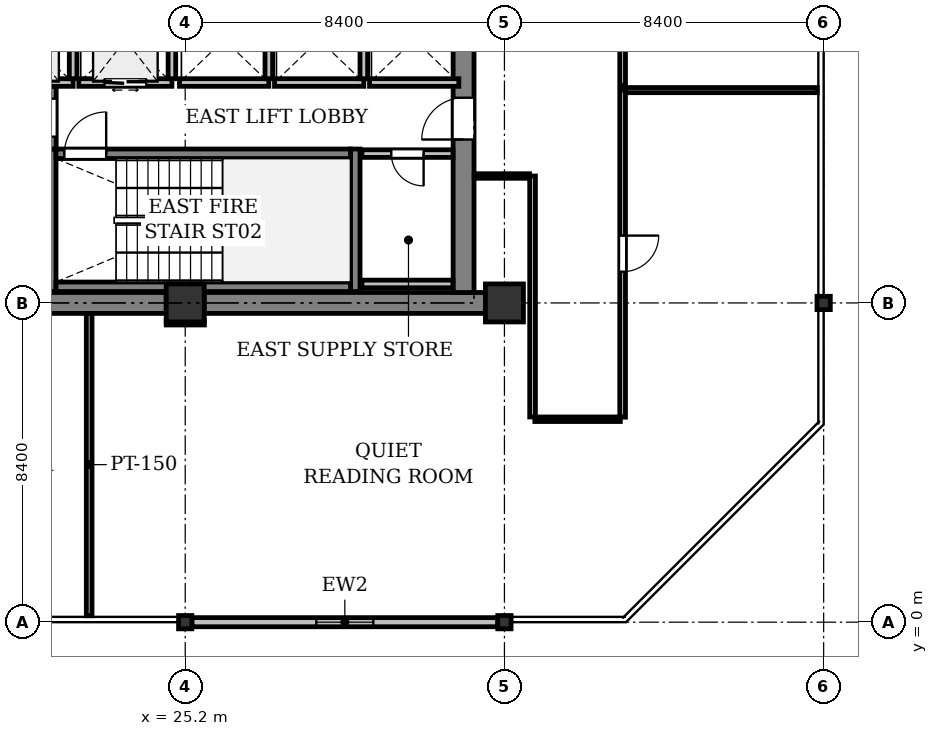
"""IFC4 building model, lengths in metres.
Left out: names, types, materials, properties, quantities, classifications, styles, units other than length and angle.
Written with IfcOpenShell. Run it as: python <this file> out.ifc"""

import sys

from ifc_helpers import new_model, si_unit, direction, frame, frame_2d, origin, origin_2d, place, context, subcontext, project, spatial, rectangle, i_section, extrude, element, fill, save


model = new_model("IFC4")
c1 = context("Model", 3, precision=1e-05, world=origin(), true_north=direction((0.0, 1.0)))
c2 = subcontext(c1, "Body", "Model", "MODEL_VIEW")
j1 = project(units=[si_unit("LENGTHUNIT", "METRE"), si_unit("PLANEANGLEUNIT", "RADIAN")], contexts=[c1])
p1 = place(None, origin())
s1 = spatial("IfcSite", under=j1, at=p1, CompositionType="ELEMENT")
p2 = place(p1, origin())
s2 = spatial("IfcBuilding", under=s1, at=p2, CompositionType="ELEMENT")
p3 = place(p2, frame((0.0, 0.0, 208.3)))
s3 = spatial("IfcBuildingStorey", under=s2, at=p3, CompositionType="ELEMENT", Elevation=208.3)
p4 = place(p3, frame((25.2, 0.0, 0.0), z_axis=(0.0, 0.0, 1.0), x_axis=(1.0, 0.0, 0.0)))
e1 = element("IfcColumn", 1, at=p4, inside=s3, PredefinedType="COLUMN", context=c2, shape_type="SweptSolid", body=[
    extrude(i_section(OverallWidth=0.35, OverallDepth=0.35, WebThickness=0.02, FlangeThickness=0.032, at=origin_2d()), origin(), (0.0, 0.0, 1.0), 4.1),
])
p5 = place(p3, frame((25.2, 8.4, 0.0), z_axis=(0.0, 0.0, 1.0), x_axis=(1.0, 0.0, 0.0)))
e2 = element("IfcColumn", 2, at=p5, inside=s3, PredefinedType="COLUMN", context=c2, shape_type="SweptSolid", body=[
    extrude(rectangle(XDim=1.0, YDim=1.0, at=origin_2d()), origin(), (0.0, 0.0, 1.0), 4.1),
])
p6 = place(p3, frame((33.6, 0.0, 0.0), z_axis=(0.0, 0.0, 1.0), x_axis=(1.0, 0.0, 0.0)))
e3 = element("IfcColumn", 3, at=p6, inside=s3, PredefinedType="COLUMN", context=c2, shape_type="SweptSolid", body=[
    extrude(i_section(OverallWidth=0.35, OverallDepth=0.35, WebThickness=0.02, FlangeThickness=0.032, at=origin_2d()), origin(), (0.0, 0.0, 1.0), 4.1),
])
p7 = place(p3, frame((33.6, 8.4, 0.0), z_axis=(0.0, 0.0, 1.0), x_axis=(1.0, 0.0, 0.0)))
e4 = element("IfcColumn", 4, at=p7, inside=s3, PredefinedType="COLUMN", context=c2, shape_type="SweptSolid", body=[
    extrude(rectangle(XDim=1.0, YDim=1.0, at=origin_2d()), origin(), (0.0, 0.0, 1.0), 4.1),
])
p8 = place(p3, frame((42.0, 8.4, 0.0), z_axis=(0.0, 0.0, 1.0), x_axis=(1.0, 0.0, 0.0)))
e5 = element("IfcColumn", 5, at=p8, inside=s3, PredefinedType="COLUMN", context=c2, shape_type="SweptSolid", body=[
    extrude(i_section(OverallWidth=0.35, OverallDepth=0.35, WebThickness=0.02, FlangeThickness=0.032, at=origin_2d()), origin(), (0.0, 0.0, 1.0), 4.1),
])
p9 = place(p3, frame((33.425, 0.0, 0.0), z_axis=(0.0, 0.0, 1.0), x_axis=(-1.0, 0.0, 0.0)))
e6 = element("IfcWall", 6, at=p9, inside=s3, PredefinedType="STANDARD", context=c2, shape_type="SweptSolid", body=[
    extrude(rectangle(XDim=8.05, YDim=0.24, at=frame_2d((4.025, 0.0))), origin(), (0.0, 0.0, 1.0), 3.525),
])
p10 = place(p9, frame((3.275, 0.0, 0.9)))
e7 = element("IfcOpeningElement", 7, at=p10, cuts=e6, PredefinedType="OPENING", context=c2, shape_type="SweptSolid", body=[
    extrude(rectangle(XDim=1.5, YDim=1.6, at=frame_2d((0.75, 0.8))), frame((0.0, 0.13, 0.0), z_axis=(0.0, -1.0, 0.0), x_axis=(1.0, 0.0, 0.0)), (0.0, 0.0, 1.0), 0.26),
])
p11 = place(p3, frame((17.3, 8.4, 0.0), z_axis=(0.0, 0.0, 1.0), x_axis=(1.0, 0.0, 0.0)))
e8 = element("IfcWall", 8, at=p11, inside=s3, PredefinedType="SHEAR", context=c2, shape_type="SweptSolid", body=[
    extrude(rectangle(XDim=7.4, YDim=0.55, at=frame_2d((3.7, 0.0))), origin(), (0.0, 0.0, 1.0), 3.825),
])
p12 = place(p3, frame((25.7, 8.4, 0.0), z_axis=(0.0, 0.0, 1.0), x_axis=(1.0, 0.0, 0.0)))
e9 = element("IfcWall", 9, at=p12, inside=s3, PredefinedType="SHEAR", context=c2, shape_type="SweptSolid", body=[
    extrude(rectangle(XDim=7.4, YDim=0.55, at=frame_2d((3.7, 0.0))), origin(), (0.0, 0.0, 1.0), 3.825),
])
p13 = place(p3, frame((32.525, 8.675, 0.0), z_axis=(0.0, 0.0, 1.0), x_axis=(0.0, 1.0, 0.0)))
e10 = element("IfcWall", 10, at=p13, inside=s3, PredefinedType="SHEAR", context=c2, shape_type="SweptSolid", body=[
    extrude(rectangle(XDim=7.85, YDim=0.55, at=frame_2d((3.925, 0.0))), origin(), (0.0, 0.0, 1.0), 3.825),
])
p14 = place(p13, frame((4.025, 0.0, 0.0)))
e11 = element("IfcOpeningElement", 11, at=p14, cuts=e10, PredefinedType="OPENING", context=c2, shape_type="SweptSolid", body=[
    extrude(rectangle(XDim=1.1, YDim=2.15, at=frame_2d((0.55, 1.075))), frame((0.0, 0.285, 0.0), z_axis=(0.0, -1.0, 0.0), x_axis=(1.0, 0.0, 0.0)), (0.0, 0.0, 1.0), 0.57),
])
for number, where, z_axis, x_axis in (
    (12, (21.675, 8.7, 0.0), (0.0, 0.0, 1.0), (0.0, 1.0, 0.0)),
    (13, (29.675, 8.7, 0.0), (0.0, 0.0, 1.0), (0.0, 1.0, 0.0)),
):
    element("IfcWall", number, at=place(p3, frame(where, z_axis=z_axis, x_axis=x_axis)), inside=s3, PredefinedType="SHEAR", context=c2, shape_type="SweptSolid", body=[
        extrude(rectangle(XDim=3.75, YDim=0.25, at=frame_2d((1.875, 0.0))), origin(), (0.0, 0.0, 1.0), 3.825),
    ])
p15 = place(p3, frame((21.8, 8.825, 0.0), z_axis=(0.0, 0.0, 1.0), x_axis=(1.0, 0.0, 0.0)))
e14 = element("IfcWall", 14, at=p15, inside=s3, PredefinedType="SHEAR", context=c2, shape_type="SweptSolid", body=[
    extrude(rectangle(XDim=7.75, YDim=0.25, at=frame_2d((3.875, 0.0))), origin(), (0.0, 0.0, 1.0), 3.825),
])
p16 = place(p3, frame((21.8, 12.325, 0.0), z_axis=(0.0, 0.0, 1.0), x_axis=(1.0, 0.0, 0.0)))
e15 = element("IfcWall", 15, at=p16, inside=s3, PredefinedType="SHEAR", context=c2, shape_type="SweptSolid", body=[
    extrude(rectangle(XDim=7.75, YDim=0.25, at=frame_2d((3.875, 0.0))), origin(), (0.0, 0.0, 1.0), 3.825),
])
p17 = place(p16, frame((0.22, 0.0, 0.0)))
e16 = element("IfcOpeningElement", 16, at=p17, cuts=e15, PredefinedType="OPENING", context=c2, shape_type="SweptSolid", body=[
    extrude(rectangle(XDim=1.1, YDim=2.15, at=frame_2d((0.55, 1.075))), frame((0.0, 0.135, 0.0), z_axis=(0.0, -1.0, 0.0), x_axis=(1.0, 0.0, 0.0)), (0.0, 0.0, 1.0), 0.27),
])
p18 = place(p3, frame((21.68, 12.45, 0.0), z_axis=(0.0, 0.0, 1.0), x_axis=(0.0, 1.0, 0.0)))
e17 = element("IfcWall", 17, at=p18, inside=s3, PredefinedType="SHEAR", context=c2, shape_type="SweptSolid", body=[
    extrude(rectangle(XDim=1.65, YDim=0.25, at=frame_2d((0.825, 0.0))), origin(), (0.0, 0.0, 1.0), 3.825),
])
p19 = place(p18, frame((0.325, 0.0, 0.0)))
e18 = element("IfcOpeningElement", 18, at=p19, cuts=e17, PredefinedType="OPENING", context=c2, shape_type="SweptSolid", body=[
    extrude(rectangle(XDim=1.0, YDim=2.15, at=frame_2d((0.5, 1.075))), frame((0.0, 0.135, 0.0), z_axis=(0.0, -1.0, 0.0), x_axis=(1.0, 0.0, 0.0)), (0.0, 0.0, 1.0), 0.27),
])
p20 = place(p3, frame((19.8, 14.2, 0.0), z_axis=(0.0, 0.0, 1.0), x_axis=(1.0, 0.0, 0.0)))
e19 = element("IfcWall", 19, at=p20, inside=s3, PredefinedType="PARTITIONING", context=c2, shape_type="SweptSolid", body=[
    extrude(rectangle(XDim=2.45, YDim=0.2, at=frame_2d((1.225, 0.0))), origin(), (0.0, 0.0, 1.0), 3.825),
])
p21 = place(p20, frame((0.675, 0.0, 0.0)))
e20 = element("IfcOpeningElement", 20, at=p21, cuts=e19, PredefinedType="OPENING", context=c2, shape_type="SweptSolid", body=[
    extrude(rectangle(XDim=1.1, YDim=2.2, at=frame_2d((0.55, 1.1))), frame((0.0, 0.11, 0.0), z_axis=(0.0, -1.0, 0.0), x_axis=(1.0, 0.0, 0.0)), (0.0, 0.0, 1.0), 0.22),
])
p22 = place(p3, frame((22.25, 14.3, 0.0), z_axis=(0.0, 0.0, 1.0), x_axis=(0.0, 1.0, 0.0)))
e21 = element("IfcWall", 21, at=p22, inside=s3, PredefinedType="PARTITIONING", context=c2, shape_type="SweptSolid", body=[
    extrude(rectangle(XDim=2.05, YDim=0.2, at=frame_2d((1.025, 0.0))), origin(), (0.0, 0.0, 1.0), 3.825),
])
p23 = place(p3, frame((22.4, 14.2, 0.0), z_axis=(0.0, 0.0, 1.0), x_axis=(1.0, 0.0, 0.0)))
e22 = element("IfcWall", 22, at=p23, inside=s3, PredefinedType="PARTITIONING", context=c2, shape_type="SweptSolid", body=[
    extrude(rectangle(XDim=2.45, YDim=0.2, at=frame_2d((1.225, 0.0))), origin(), (0.0, 0.0, 1.0), 3.825),
])
p24 = place(p23, frame((0.675, 0.0, 0.0)))
e23 = element("IfcOpeningElement", 23, at=p24, cuts=e22, PredefinedType="OPENING", context=c2, shape_type="SweptSolid", body=[
    extrude(rectangle(XDim=1.1, YDim=2.2, at=frame_2d((0.55, 1.1))), frame((0.0, 0.11, 0.0), z_axis=(0.0, -1.0, 0.0), x_axis=(1.0, 0.0, 0.0)), (0.0, 0.0, 1.0), 0.22),
])
p25 = place(p3, frame((24.85, 14.3, 0.0), z_axis=(0.0, 0.0, 1.0), x_axis=(0.0, 1.0, 0.0)))
e24 = element("IfcWall", 24, at=p25, inside=s3, PredefinedType="PARTITIONING", context=c2, shape_type="SweptSolid", body=[
    extrude(rectangle(XDim=2.05, YDim=0.2, at=frame_2d((1.025, 0.0))), origin(), (0.0, 0.0, 1.0), 3.825),
])
p26 = place(p3, frame((25.05, 14.2, 0.0), z_axis=(0.0, 0.0, 1.0), x_axis=(1.0, 0.0, 0.0)))
e25 = element("IfcWall", 25, at=p26, inside=s3, PredefinedType="PARTITIONING", context=c2, shape_type="SweptSolid", body=[
    extrude(rectangle(XDim=2.35, YDim=0.2, at=frame_2d((1.175, 0.0))), origin(), (0.0, 0.0, 1.0), 3.825),
])
p27 = place(p3, frame((27.4, 14.3, 0.0), z_axis=(0.0, 0.0, 1.0), x_axis=(0.0, 1.0, 0.0)))
e26 = element("IfcWall", 26, at=p27, inside=s3, PredefinedType="PARTITIONING", context=c2, shape_type="SweptSolid", body=[
    extrude(rectangle(XDim=2.05, YDim=0.2, at=frame_2d((1.025, 0.0))), origin(), (0.0, 0.0, 1.0), 3.825),
])
p28 = place(p3, frame((27.55, 14.2, 0.0), z_axis=(0.0, 0.0, 1.0), x_axis=(1.0, 0.0, 0.0)))
e27 = element("IfcWall", 27, at=p28, inside=s3, PredefinedType="PARTITIONING", context=c2, shape_type="SweptSolid", body=[
    extrude(rectangle(XDim=2.35, YDim=0.2, at=frame_2d((1.175, 0.0))), origin(), (0.0, 0.0, 1.0), 3.825),
])
p29 = place(p3, frame((29.9, 14.3, 0.0), z_axis=(0.0, 0.0, 1.0), x_axis=(0.0, 1.0, 0.0)))
e28 = element("IfcWall", 28, at=p29, inside=s3, PredefinedType="PARTITIONING", context=c2, shape_type="SweptSolid", body=[
    extrude(rectangle(XDim=2.05, YDim=0.2, at=frame_2d((1.025, 0.0))), origin(), (0.0, 0.0, 1.0), 3.825),
])
p30 = place(p3, frame((30.05, 14.2, 0.0), z_axis=(0.0, 0.0, 1.0), x_axis=(1.0, 0.0, 0.0)))
e29 = element("IfcWall", 29, at=p30, inside=s3, PredefinedType="PARTITIONING", context=c2, shape_type="SweptSolid", body=[
    extrude(rectangle(XDim=2.35, YDim=0.2, at=frame_2d((1.175, 0.0))), origin(), (0.0, 0.0, 1.0), 3.825),
])
p31 = place(p3, frame((32.246, 12.33, 0.0), z_axis=(0.0, 0.0, 1.0), x_axis=(-1.0, 0.0, 0.0)))
e30 = element("IfcWall", 30, at=p31, inside=s3, PredefinedType="PARTITIONING", context=c2, shape_type="SweptSolid", body=[
    extrude(rectangle(XDim=2.396, YDim=0.2, at=frame_2d((1.198, 0.0))), origin(), (0.0, 0.0, 1.0), 3.825),
])
p32 = place(p31, frame((0.773, 0.0, 0.0)))
e31 = element("IfcOpeningElement", 31, at=p32, cuts=e30, PredefinedType="OPENING", context=c2, shape_type="SweptSolid", body=[
    extrude(rectangle(XDim=0.85, YDim=2.15, at=frame_2d((0.425, 1.075))), frame((0.0, 0.11, 0.0), z_axis=(0.0, -1.0, 0.0), x_axis=(1.0, 0.0, 0.0)), (0.0, 0.0, 1.0), 0.22),
])
p33 = place(p3, frame((29.85, 8.9, 0.0), z_axis=(0.0, 0.0, 1.0), x_axis=(1.0, 0.0, 0.0)))
e32 = element("IfcWall", 32, at=p33, inside=s3, PredefinedType="PARTITIONING", context=c2, shape_type="SweptSolid", body=[
    extrude(rectangle(XDim=2.396, YDim=0.2, at=frame_2d((1.198, 0.0))), origin(), (0.0, 0.0, 1.0), 3.825),
])
p34 = place(p3, frame((22.673, 0.169, 0.0), z_axis=(0.0, 0.0, 1.0), x_axis=(0.0, 1.0, 0.0)))
e33 = element("IfcWall", 33, at=p34, inside=s3, PredefinedType="PARTITIONING", context=c2, shape_type="SweptSolid", body=[
    extrude(rectangle(XDim=7.952, YDim=0.15, at=frame_2d((3.976, 0.0))), origin(), (0.0, 0.0, 1.0), 3.825),
])
p35 = place(p3, frame((41.831, 14.0, 0.0), z_axis=(0.0, 0.0, 1.0), x_axis=(-1.0, 0.0, 0.0)))
e34 = element("IfcWall", 34, at=p35, inside=s3, PredefinedType="PARTITIONING", context=c2, shape_type="SweptSolid", body=[
    extrude(rectangle(XDim=5.121, YDim=0.135, at=frame_2d((2.561, 0.0))), origin(), (0.0, 0.0, 1.0), 3.518),
])
p36 = place(p3, frame((36.71, 14.0, 0.0), z_axis=(0.0, 0.0, 1.0), x_axis=(-2.836799e-05, -0.999999999598, 0.0)))
e35 = element("IfcWall", 35, at=p36, inside=s3, PredefinedType="PARTITIONING", context=c2, shape_type="SweptSolid", body=[
    extrude(rectangle(XDim=8.606, YDim=0.15, at=frame_2d((4.303, 0.0))), origin(), (0.0, 0.0, 1.0), 3.365),
])
p37 = place(p36, frame((3.828, 0.0, 0.0)))
e36 = element("IfcOpeningElement", 36, at=p37, cuts=e35, PredefinedType="OPENING", context=c2, shape_type="SweptSolid", body=[
    extrude(rectangle(XDim=0.95, YDim=2.15, at=frame_2d((0.475, 1.075))), frame((0.0, 0.085, 0.0), z_axis=(0.0, -1.0, 0.0), x_axis=(1.0, 0.0, 0.0)), (0.0, 0.0, 1.0), 0.17),
])
p38 = place(p3, frame((36.65, 5.34, 0.0), z_axis=(0.0, 0.0, 1.0), x_axis=(-1.0, 0.0, 0.0)))
e37 = element("IfcWall", 37, at=p38, inside=s3, PredefinedType="PARTITIONING", context=c2, shape_type="SweptSolid", body=[
    extrude(rectangle(XDim=2.25, YDim=0.12, at=frame_2d((1.125, 0.0))), origin(), (0.0, 0.0, 1.0), 3.825),
])
p39 = place(p3, frame((34.34, 5.4, 0.0), z_axis=(0.0, 0.0, 1.0), x_axis=(0.0, 1.0, 0.0)))
e38 = element("IfcWall", 38, at=p39, inside=s3, PredefinedType="PARTITIONING", context=c2, shape_type="SweptSolid", body=[
    extrude(rectangle(XDim=6.34, YDim=0.15, at=frame_2d((3.17, 0.0))), origin(), (0.0, 0.0, 1.0), 3.365),
])
p40 = place(p3, frame((34.261, 11.74, 0.0), z_axis=(0.0, 0.0, 1.0), x_axis=(-1.0, 0.0, 0.0)))
e39 = element("IfcWall", 39, at=p40, inside=s3, PredefinedType="PARTITIONING", context=c2, shape_type="SweptSolid", body=[
    extrude(rectangle(XDim=1.457, YDim=0.12, at=frame_2d((0.729, 0.0))), origin(), (0.0, 0.0, 1.0), 3.371),
])
p41 = place(p3, frame((25.704, 7.88, 0.0), z_axis=(0.0, 0.0, 1.0), x_axis=(-0.999999881717, -0.000486381265, 0.0)))
e40 = element("IfcWall", 40, at=p41, inside=s3, PredefinedType="PARTITIONING", context=c2, shape_type="SweptSolid", body=[
    extrude(rectangle(XDim=1.004, YDim=0.12, at=frame_2d((0.502, 0.0))), origin(), (0.0, 0.0, 1.0), 3.371),
])
p42 = place(p3, frame((36.71, 19.9, 0.0), z_axis=(0.0, 0.0, 1.0), x_axis=(0.0, -1.0, 0.0)))
e41 = element("IfcWall", 41, at=p42, inside=s3, PredefinedType="PARTITIONING", context=c2, shape_type="SweptSolid", body=[
    extrude(rectangle(XDim=5.78, YDim=0.15, at=frame_2d((2.89, 0.0))), origin(), (0.0, 0.0, 1.0), 3.365),
])
p43 = place(p10, origin())
e42 = element("IfcWindow", 42, at=p43, inside=s3, PartitioningType="SINGLE_PANEL", PredefinedType="WINDOW", context=c2, shape_type="SweptSolid", body=[
    extrude(rectangle(XDim=1.5, YDim=1.6, at=frame_2d((0.75, 0.8))), frame((0.0, 0.03, 0.0), z_axis=(0.0, -1.0, 0.0), x_axis=(1.0, 0.0, 0.0)), (0.0, 0.0, 1.0), 0.06),
])
fill(e7, e42)
p44 = place(p14, origin())
e43 = element("IfcDoor", 43, at=p44, inside=s3, OperationType="SINGLE_SWING_LEFT", PredefinedType="DOOR", context=c2, shape_type="SweptSolid", body=[
    extrude(rectangle(XDim=1.1, YDim=2.15, at=frame_2d((0.55, 1.075))), frame((0.0, 0.025, 0.0), z_axis=(0.0, -1.0, 0.0), x_axis=(1.0, 0.0, 0.0)), (0.0, 0.0, 1.0), 0.05),
])
fill(e11, e43)
p45 = place(p17, origin())
e44 = element("IfcDoor", 44, at=p45, inside=s3, OperationType="SINGLE_SWING_RIGHT", PredefinedType="DOOR", context=c2, shape_type="SweptSolid", body=[
    extrude(rectangle(XDim=1.1, YDim=2.15, at=frame_2d((0.55, 1.075))), frame((0.0, 0.025, 0.0), z_axis=(0.0, -1.0, 0.0), x_axis=(1.0, 0.0, 0.0)), (0.0, 0.0, 1.0), 0.05),
])
fill(e16, e44)
p46 = place(p19, origin())
e45 = element("IfcDoor", 45, at=p46, inside=s3, OperationType="SINGLE_SWING_RIGHT", PredefinedType="DOOR", context=c2, shape_type="SweptSolid", body=[
    extrude(rectangle(XDim=1.0, YDim=2.15, at=frame_2d((0.5, 1.075))), frame((0.0, 0.025, 0.0), z_axis=(0.0, -1.0, 0.0), x_axis=(1.0, 0.0, 0.0)), (0.0, 0.0, 1.0), 0.05),
])
fill(e18, e45)
p47 = place(p24, origin())
e46 = element("IfcDoor", 46, at=p47, inside=s3, OperationType="DOUBLE_DOOR_SLIDING", PredefinedType="DOOR", context=c2, shape_type="SweptSolid", body=[
    extrude(rectangle(XDim=1.1, YDim=2.2, at=frame_2d((0.55, 1.1))), frame((0.0, 0.025, 0.0), z_axis=(0.0, -1.0, 0.0), x_axis=(1.0, 0.0, 0.0)), (0.0, 0.0, 1.0), 0.05),
])
fill(e23, e46)
p48 = place(p32, origin())
e47 = element("IfcDoor", 47, at=p48, inside=s3, OperationType="SINGLE_SWING_LEFT", PredefinedType="DOOR", context=c2, shape_type="SweptSolid", body=[
    extrude(rectangle(XDim=0.85, YDim=2.15, at=frame_2d((0.425, 1.075))), frame((0.0, 0.025, 0.0), z_axis=(0.0, -1.0, 0.0), x_axis=(1.0, 0.0, 0.0)), (0.0, 0.0, 1.0), 0.05),
])
fill(e31, e47)
p49 = place(p37, origin())
e48 = element("IfcDoor", 48, at=p49, inside=s3, OperationType="SINGLE_SWING_LEFT", PredefinedType="DOOR", context=c2, shape_type="SweptSolid", body=[
    extrude(rectangle(XDim=0.95, YDim=2.15, at=frame_2d((0.475, 1.075))), frame((0.0, 0.025, 0.0), z_axis=(0.0, -1.0, 0.0), x_axis=(1.0, 0.0, 0.0)), (0.0, 0.0, 1.0), 0.05),
])
fill(e36, e48)
save(model, sys.argv[1])
